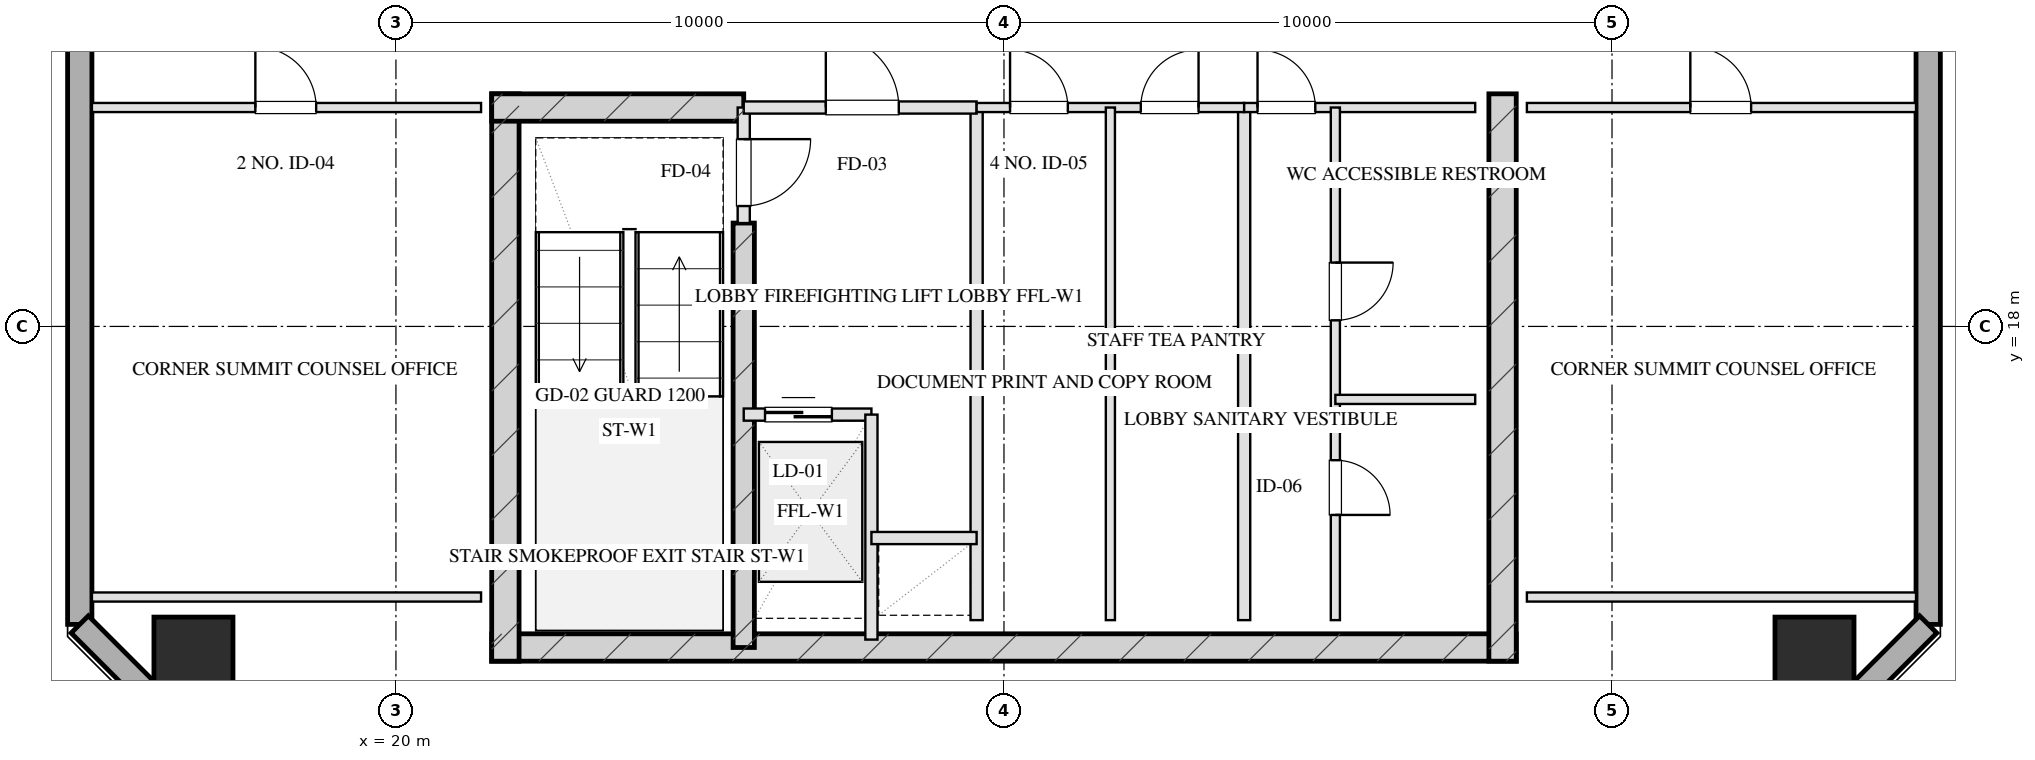
"""IFC4 building model, lengths in metres.
Left out: names, types, materials, properties, quantities, classifications, styles, units other than length and angle.
Written with IfcOpenShell. Run it as: python <this file> out.ifc"""

import sys

from ifc_helpers import new_model, si_unit, direction, frame, frame_2d, origin, origin_2d, place, context, subcontext, project, spatial, rectangle, hollow_rectangle, extrude, element, fill, save


model = new_model("IFC4")
c1 = context("Model", 3, precision=1e-05, world=origin(), true_north=direction((0.0, 1.0)))
c2 = subcontext(c1, "Body", "Model", "MODEL_VIEW")
j1 = project(units=[si_unit("LENGTHUNIT", "METRE"), si_unit("PLANEANGLEUNIT", "RADIAN")], contexts=[c1])
p1 = place(None, origin())
s1 = spatial("IfcSite", under=j1, at=p1, CompositionType="ELEMENT")
p2 = place(p1, origin())
s2 = spatial("IfcBuilding", under=s1, at=p2, CompositionType="ELEMENT")
p3 = place(p2, frame((0.0, 0.0, 256.8)))
s3 = spatial("IfcBuildingStorey", under=s2, at=p3, CompositionType="ELEMENT", Elevation=256.8)
p4 = place(p3, frame((21.575, 12.72, 0.0), z_axis=(0.0, 0.0, 1.0), x_axis=(1.0, 0.0, 0.0)))
e1 = element("IfcWall", 1, at=p4, inside=s3, PredefinedType="SHEAR", context=c2, shape_type="SweptSolid", body=[
    extrude(rectangle(XDim=16.85, YDim=0.45, at=frame_2d((8.425, 0.0))), origin(), (0.0, 0.0, 1.0), 3.2),
])
for number, where, z_axis, x_axis in (
    (2, (21.8, 21.825, 0.0), (0.0, 0.0, 1.0), (0.0, -1.0, 0.0)),
    (3, (38.2, 21.825, 0.0), (0.0, 0.0, 1.0), (0.0, -1.0, 0.0)),
):
    element("IfcWall", number, at=place(p3, frame(where, z_axis=z_axis, x_axis=x_axis)), inside=s3, PredefinedType="SHEAR", context=c2, shape_type="SweptSolid", body=[
        extrude(rectangle(XDim=9.33, YDim=0.45, at=frame_2d((4.665, 0.0))), origin(), (0.0, 0.0, 1.0), 3.2),
    ])
p5 = place(p3, frame((25.72, 19.7, 0.0), z_axis=(0.0, 0.0, 1.0), x_axis=(0.0, -1.0, 0.0)))
e4 = element("IfcWall", 4, at=p5, inside=s3, PredefinedType="SHEAR", context=c2, shape_type="SweptSolid", body=[
    extrude(rectangle(XDim=6.98, YDim=0.35, at=frame_2d((3.49, 0.0))), origin(), (0.0, 0.0, 1.0), 3.2),
])
p6 = place(p3, frame((21.575, 21.6, 0.0), z_axis=(0.0, 0.0, 1.0), x_axis=(1.0, 0.0, 0.0)))
e5 = element("IfcWall", 5, at=p6, inside=s3, PredefinedType="SHEAR", context=c2, shape_type="SweptSolid", body=[
    extrude(rectangle(XDim=4.145, YDim=0.45, at=frame_2d((2.073, 0.0))), origin(), (0.0, 0.0, 1.0), 3.2),
])
for number, where, z_axis, x_axis in (
    (6, (16.67, 12.57, 0.0), (0.0, 0.0, 1.0), (1.0, 0.0, 0.0)),
    (7, (43.33, 12.57, 0.0), (0.0, 0.0, 1.0), (1.0, 0.0, 0.0)),
):
    element("IfcColumn", number, at=place(p3, frame(where, z_axis=z_axis, x_axis=x_axis)), inside=s3, PredefinedType="COLUMN", context=c2, shape_type="SweptSolid", body=[
        extrude(hollow_rectangle(XDim=1.3, YDim=1.3, WallThickness=0.045, at=origin_2d()), origin(), (0.0, 0.0, 1.0), 3.201),
    ])
p7 = place(p3, frame((14.8, 13.1, 0.0), z_axis=(0.0, 0.0, 1.0), x_axis=(0.0, 1.0, 0.0)))
e8 = element("IfcWall", 8, at=p7, inside=s3, PredefinedType="SOLIDWALL", context=c2, shape_type="SweptSolid", body=[
    extrude(rectangle(XDim=41.8, YDim=0.4, at=frame_2d((20.9, 0.0))), origin(), (0.0, 0.0, 1.0), 2.36),
])
p8 = place(p7, frame((22.525, 0.0, 0.75)))
e9 = element("IfcOpeningElement", 9, at=p8, cuts=e8, PredefinedType="OPENING", context=c2, shape_type="SweptSolid", body=[
    extrude(rectangle(XDim=1.95, YDim=1.21, at=frame_2d((0.975, 0.605))), frame((0.0, 0.21, 0.0), z_axis=(0.0, -1.0, 0.0), x_axis=(1.0, 0.0, 0.0)), (0.0, 0.0, 1.0), 0.42),
])
p9 = place(p7, frame((26.325, 0.0, 0.75)))
e10 = element("IfcOpeningElement", 10, at=p9, cuts=e8, PredefinedType="OPENING", context=c2, shape_type="SweptSolid", body=[
    extrude(rectangle(XDim=1.95, YDim=1.21, at=frame_2d((0.975, 0.605))), frame((0.0, 0.21, 0.0), z_axis=(0.0, -1.0, 0.0), x_axis=(1.0, 0.0, 0.0)), (0.0, 0.0, 1.0), 0.42),
])
p10 = place(p7, frame((14.55, 0.0, 0.0)))
e11 = element("IfcOpeningElement", 11, at=p10, cuts=e8, PredefinedType="OPENING", context=c2, shape_type="SweptSolid", body=[
    extrude(rectangle(XDim=1.1, YDim=2.15, at=frame_2d((0.55, 1.075))), frame((0.0, 0.21, 0.0), z_axis=(0.0, -1.0, 0.0), x_axis=(1.0, 0.0, 0.0)), (0.0, 0.0, 1.0), 0.42),
])
p11 = place(p3, frame((45.2, 54.9, 0.0), z_axis=(0.0, 0.0, 1.0), x_axis=(0.0, -1.0, 0.0)))
e12 = element("IfcWall", 12, at=p11, inside=s3, PredefinedType="SOLIDWALL", context=c2, shape_type="SweptSolid", body=[
    extrude(rectangle(XDim=41.8, YDim=0.4, at=frame_2d((20.9, 0.0))), origin(), (0.0, 0.0, 1.0), 2.36),
])
p12 = place(p11, frame((17.325, 0.0, 0.75)))
e13 = element("IfcOpeningElement", 13, at=p12, cuts=e12, PredefinedType="OPENING", context=c2, shape_type="SweptSolid", body=[
    extrude(rectangle(XDim=1.95, YDim=1.21, at=frame_2d((0.975, 0.605))), frame((0.0, 0.21, 0.0), z_axis=(0.0, -1.0, 0.0), x_axis=(1.0, 0.0, 0.0)), (0.0, 0.0, 1.0), 0.42),
])
p13 = place(p11, frame((13.525, 0.0, 0.75)))
e14 = element("IfcOpeningElement", 14, at=p13, cuts=e12, PredefinedType="OPENING", context=c2, shape_type="SweptSolid", body=[
    extrude(rectangle(XDim=1.95, YDim=1.21, at=frame_2d((0.975, 0.605))), frame((0.0, 0.21, 0.0), z_axis=(0.0, -1.0, 0.0), x_axis=(1.0, 0.0, 0.0)), (0.0, 0.0, 1.0), 0.42),
])
p14 = place(p11, frame((23.45, 0.0, 0.0)))
e15 = element("IfcOpeningElement", 15, at=p14, cuts=e12, PredefinedType="OPENING", context=c2, shape_type="SweptSolid", body=[
    extrude(rectangle(XDim=1.1, YDim=2.15, at=frame_2d((0.55, 1.075))), frame((0.0, 0.21, 0.0), z_axis=(0.0, -1.0, 0.0), x_axis=(1.0, 0.0, 0.0)), (0.0, 0.0, 1.0), 0.42),
])
for number, where, z_axis, x_axis in (
    (16, (45.2, 13.1, 0.0), (0.0, 0.0, 1.0), (-0.707, -0.707, 0.0)),
    (17, (17.2, 10.7, 0.0), (0.0, 0.0, 1.0), (-0.707, 0.707, 0.0)),
):
    element("IfcWall", number, at=place(p3, frame(where, z_axis=z_axis, x_axis=x_axis)), inside=s3, PredefinedType="SOLIDWALL", context=c2, shape_type="SweptSolid", body=[
        extrude(rectangle(XDim=3.394, YDim=0.4, at=frame_2d((1.697, 0.0))), origin(), (0.0, 0.0, 1.0), 2.36),
    ])
p15 = place(p3, frame((25.72, 21.6, 0.0), z_axis=(0.0, 0.0, 1.0), x_axis=(0.0, -1.0, 0.0)))
e18 = element("IfcWall", 18, at=p15, inside=s3, PredefinedType="PARTITIONING", context=c2, shape_type="SweptSolid", body=[
    extrude(rectangle(XDim=1.9, YDim=0.2, at=frame_2d((0.95, 0.0))), origin(), (0.0, 0.0, 1.0), 2.925),
])
p16 = place(p15, frame((0.52, 0.0, 0.0)))
e19 = element("IfcOpeningElement", 19, at=p16, cuts=e18, PredefinedType="OPENING", context=c2, shape_type="SweptSolid", body=[
    extrude(rectangle(XDim=1.1, YDim=2.05, at=frame_2d((0.55, 1.025))), frame((0.0, 0.11, 0.0), z_axis=(0.0, -1.0, 0.0), x_axis=(1.0, 0.0, 0.0)), (0.0, 0.0, 1.0), 0.22),
])
p17 = place(p3, frame((29.55, 21.6, 0.0), z_axis=(0.0, 0.0, 1.0), x_axis=(0.0, -1.0, 0.0)))
e20 = element("IfcWall", 20, at=p17, inside=s3, PredefinedType="PARTITIONING", context=c2, shape_type="SweptSolid", body=[
    extrude(rectangle(XDim=8.43, YDim=0.2, at=frame_2d((4.215, 0.0))), origin(), (0.0, 0.0, 1.0), 2.925),
])
p18 = place(p3, frame((25.72, 21.6, 0.0), z_axis=(0.0, 0.0, 1.0), x_axis=(1.0, 0.0, 0.0)))
e21 = element("IfcWall", 21, at=p18, inside=s3, PredefinedType="PARTITIONING", context=c2, shape_type="SweptSolid", body=[
    extrude(rectangle(XDim=3.83, YDim=0.2, at=frame_2d((1.915, 0.0))), origin(), (0.0, 0.0, 1.0), 2.925),
])
p19 = place(p18, frame((1.35, 0.0, 0.0)))
e22 = element("IfcOpeningElement", 22, at=p19, cuts=e21, PredefinedType="OPENING", context=c2, shape_type="SweptSolid", body=[
    extrude(rectangle(XDim=1.2, YDim=2.05, at=frame_2d((0.6, 1.025))), frame((0.0, 0.11, 0.0), z_axis=(0.0, -1.0, 0.0), x_axis=(1.0, 0.0, 0.0)), (0.0, 0.0, 1.0), 0.22),
])
p20 = place(p3, frame((25.72, 16.55, 0.0), z_axis=(0.0, 0.0, 1.0), x_axis=(1.0, 0.0, 0.0)))
e23 = element("IfcWall", 23, at=p20, inside=s3, PredefinedType="PARTITIONING", context=c2, shape_type="SweptSolid", body=[
    extrude(rectangle(XDim=2.1, YDim=0.2, at=frame_2d((1.05, 0.0))), origin(), (0.0, 0.0, 1.0), 2.925),
])
p21 = place(p20, frame((0.35, 0.0, 0.0)))
e24 = element("IfcOpeningElement", 24, at=p21, cuts=e23, PredefinedType="OPENING", context=c2, shape_type="SweptSolid", body=[
    extrude(rectangle(XDim=1.1, YDim=2.05, at=frame_2d((0.55, 1.025))), frame((0.0, 0.11, 0.0), z_axis=(0.0, -1.0, 0.0), x_axis=(1.0, 0.0, 0.0)), (0.0, 0.0, 1.0), 0.22),
])
p22 = place(p3, frame((27.82, 16.55, 0.0), z_axis=(0.0, 0.0, 1.0), x_axis=(0.0, -1.0, 0.0)))
e25 = element("IfcWall", 25, at=p22, inside=s3, PredefinedType="PARTITIONING", context=c2, shape_type="SweptSolid", body=[
    extrude(rectangle(XDim=3.7, YDim=0.2, at=frame_2d((1.85, 0.0))), origin(), (0.0, 0.0, 1.0), 2.925),
])
p23 = place(p3, frame((27.82, 14.52, 0.0), z_axis=(0.0, 0.0, 1.0), x_axis=(1.0, 0.0, 0.0)))
e26 = element("IfcWall", 26, at=p23, inside=s3, PredefinedType="PARTITIONING", context=c2, shape_type="SweptSolid", body=[
    extrude(rectangle(XDim=1.73, YDim=0.2, at=frame_2d((0.865, 0.0))), origin(), (0.0, 0.0, 1.0), 2.925),
])
p24 = place(p3, frame((33.95, 21.6, 0.0), z_axis=(0.0, 0.0, 1.0), x_axis=(0.0, -1.0, 0.0)))
e27 = element("IfcWall", 27, at=p24, inside=s3, PredefinedType="PARTITIONING", context=c2, shape_type="SweptSolid", body=[
    extrude(rectangle(XDim=8.43, YDim=0.2, at=frame_2d((4.215, 0.0))), origin(), (0.0, 0.0, 1.0), 2.925),
])
p25 = place(p3, frame((29.55, 21.6, 0.0), z_axis=(0.0, 0.0, 1.0), x_axis=(1.0, 0.0, 0.0)))
e28 = element("IfcWall", 28, at=p25, inside=s3, PredefinedType="PARTITIONING", context=c2, shape_type="SweptSolid", body=[
    extrude(rectangle(XDim=4.4, YDim=0.15, at=frame_2d((2.2, 0.0))), origin(), (0.0, 0.0, 1.0), 2.925),
])
p26 = place(p25, frame((0.55, 0.0, 0.0)))
e29 = element("IfcOpeningElement", 29, at=p26, cuts=e28, PredefinedType="OPENING", context=c2, shape_type="SweptSolid", body=[
    extrude(rectangle(XDim=0.95, YDim=2.05, at=frame_2d((0.475, 1.025))), frame((0.0, 0.085, 0.0), z_axis=(0.0, -1.0, 0.0), x_axis=(1.0, 0.0, 0.0)), (0.0, 0.0, 1.0), 0.17),
])
p27 = place(p25, frame((2.7, 0.0, 0.0)))
e30 = element("IfcOpeningElement", 30, at=p27, cuts=e28, PredefinedType="OPENING", context=c2, shape_type="SweptSolid", body=[
    extrude(rectangle(XDim=0.95, YDim=2.05, at=frame_2d((0.475, 1.025))), frame((0.0, 0.085, 0.0), z_axis=(0.0, -1.0, 0.0), x_axis=(1.0, 0.0, 0.0)), (0.0, 0.0, 1.0), 0.17),
])
p28 = place(p3, frame((31.75, 21.6, 0.0), z_axis=(0.0, 0.0, 1.0), x_axis=(0.0, -1.0, 0.0)))
e31 = element("IfcWall", 31, at=p28, inside=s3, PredefinedType="PARTITIONING", context=c2, shape_type="SweptSolid", body=[
    extrude(rectangle(XDim=8.43, YDim=0.15, at=frame_2d((4.215, 0.0))), origin(), (0.0, 0.0, 1.0), 2.925),
])
p29 = place(p3, frame((33.95, 21.6, 0.0), z_axis=(0.0, 0.0, 1.0), x_axis=(1.0, 0.0, 0.0)))
e32 = element("IfcWall", 32, at=p29, inside=s3, PredefinedType="PARTITIONING", context=c2, shape_type="SweptSolid", body=[
    extrude(rectangle(XDim=3.8, YDim=0.15, at=frame_2d((1.9, 0.0))), origin(), (0.0, 0.0, 1.0), 2.925),
])
p30 = place(p29, frame((0.22, 0.0, 0.0)))
e33 = element("IfcOpeningElement", 33, at=p30, cuts=e32, PredefinedType="OPENING", context=c2, shape_type="SweptSolid", body=[
    extrude(rectangle(XDim=0.95, YDim=2.05, at=frame_2d((0.475, 1.025))), frame((0.0, 0.085, 0.0), z_axis=(0.0, -1.0, 0.0), x_axis=(1.0, 0.0, 0.0)), (0.0, 0.0, 1.0), 0.17),
])
p31 = place(p3, frame((35.45, 21.6, 0.0), z_axis=(0.0, 0.0, 1.0), x_axis=(0.0, -1.0, 0.0)))
e34 = element("IfcWall", 34, at=p31, inside=s3, PredefinedType="PARTITIONING", context=c2, shape_type="SweptSolid", body=[
    extrude(rectangle(XDim=8.43, YDim=0.15, at=frame_2d((4.215, 0.0))), origin(), (0.0, 0.0, 1.0), 2.515),
])
p32 = place(p31, frame((2.55, 0.0, 0.0)))
e35 = element("IfcOpeningElement", 35, at=p32, cuts=e34, PredefinedType="OPENING", context=c2, shape_type="SweptSolid", body=[
    extrude(rectangle(XDim=0.95, YDim=2.05, at=frame_2d((0.475, 1.025))), frame((0.0, 0.085, 0.0), z_axis=(0.0, -1.0, 0.0), x_axis=(1.0, 0.0, 0.0)), (0.0, 0.0, 1.0), 0.17),
])
p33 = place(p31, frame((5.8, 0.0, 0.0)))
e36 = element("IfcOpeningElement", 36, at=p33, cuts=e34, PredefinedType="OPENING", context=c2, shape_type="SweptSolid", body=[
    extrude(rectangle(XDim=0.9, YDim=2.05, at=frame_2d((0.45, 1.025))), frame((0.0, 0.085, 0.0), z_axis=(0.0, -1.0, 0.0), x_axis=(1.0, 0.0, 0.0)), (0.0, 0.0, 1.0), 0.17),
])
p34 = place(p3, frame((35.45, 16.8, 0.0), z_axis=(0.0, 0.0, 1.0), x_axis=(1.0, 0.0, 0.0)))
e37 = element("IfcWall", 37, at=p34, inside=s3, PredefinedType="PARTITIONING", context=c2, shape_type="SweptSolid", body=[
    extrude(rectangle(XDim=2.3, YDim=0.15, at=frame_2d((1.15, 0.0))), origin(), (0.0, 0.0, 1.0), 2.925),
])
p35 = place(p3, frame((15.0, 13.55, 0.0), z_axis=(0.0, 0.0, 1.0), x_axis=(1.0, 0.0, 0.0)))
e38 = element("IfcWall", 38, at=p35, inside=s3, PredefinedType="PARTITIONING", context=c2, shape_type="SweptSolid", body=[
    extrude(rectangle(XDim=6.4, YDim=0.15, at=frame_2d((3.2, 0.0))), origin(), (0.0, 0.0, 1.0), 2.925),
])
p36 = place(p3, frame((15.0, 21.6, 0.0), z_axis=(0.0, 0.0, 1.0), x_axis=(1.0, 0.0, 0.0)))
e39 = element("IfcWall", 39, at=p36, inside=s3, PredefinedType="PARTITIONING", context=c2, shape_type="SweptSolid", body=[
    extrude(rectangle(XDim=6.4, YDim=0.15, at=frame_2d((3.2, 0.0))), origin(), (0.0, 0.0, 1.0), 2.925),
])
p37 = place(p36, frame((2.688, 0.0, 0.0)))
e40 = element("IfcOpeningElement", 40, at=p37, cuts=e39, PredefinedType="OPENING", context=c2, shape_type="SweptSolid", body=[
    extrude(rectangle(XDim=1.0, YDim=2.05, at=frame_2d((0.5, 1.025))), frame((0.0, 0.085, 0.0), z_axis=(0.0, -1.0, 0.0), x_axis=(1.0, 0.0, 0.0)), (0.0, 0.0, 1.0), 0.17),
])
p38 = place(p3, frame((38.6, 13.55, 0.0), z_axis=(0.0, 0.0, 1.0), x_axis=(1.0, 0.0, 0.0)))
e41 = element("IfcWall", 41, at=p38, inside=s3, PredefinedType="PARTITIONING", context=c2, shape_type="SweptSolid", body=[
    extrude(rectangle(XDim=6.4, YDim=0.15, at=frame_2d((3.2, 0.0))), origin(), (0.0, 0.0, 1.0), 2.925),
])
p39 = place(p3, frame((38.6, 21.6, 0.0), z_axis=(0.0, 0.0, 1.0), x_axis=(1.0, 0.0, 0.0)))
e42 = element("IfcWall", 42, at=p39, inside=s3, PredefinedType="PARTITIONING", context=c2, shape_type="SweptSolid", body=[
    extrude(rectangle(XDim=6.4, YDim=0.15, at=frame_2d((3.2, 0.0))), origin(), (0.0, 0.0, 1.0), 2.925),
])
p40 = place(p39, frame((2.688, 0.0, 0.0)))
e43 = element("IfcOpeningElement", 43, at=p40, cuts=e42, PredefinedType="OPENING", context=c2, shape_type="SweptSolid", body=[
    extrude(rectangle(XDim=1.0, YDim=2.05, at=frame_2d((0.5, 1.025))), frame((0.0, 0.085, 0.0), z_axis=(0.0, -1.0, 0.0), x_axis=(1.0, 0.0, 0.0)), (0.0, 0.0, 1.0), 0.17),
])
p41 = place(p16, origin())
e44 = element("IfcDoor", 44, at=p41, inside=s3, OperationType="SINGLE_SWING_LEFT", PredefinedType="DOOR", context=c2, shape_type="SweptSolid", body=[
    extrude(rectangle(XDim=1.1, YDim=2.05, at=frame_2d((0.55, 1.025))), frame((0.0, 0.025, 0.0), z_axis=(0.0, -1.0, 0.0), x_axis=(1.0, 0.0, 0.0)), (0.0, 0.0, 1.0), 0.05),
])
fill(e19, e44)
p42 = place(p19, origin())
e45 = element("IfcDoor", 45, at=p42, inside=s3, OperationType="SINGLE_SWING_LEFT", PredefinedType="DOOR", context=c2, shape_type="SweptSolid", body=[
    extrude(rectangle(XDim=1.2, YDim=2.05, at=frame_2d((0.6, 1.025))), frame((0.0, 0.025, 0.0), z_axis=(0.0, -1.0, 0.0), x_axis=(1.0, 0.0, 0.0)), (0.0, 0.0, 1.0), 0.05),
])
fill(e22, e45)
p43 = place(p21, origin())
e46 = element("IfcDoor", 46, at=p43, inside=s3, OperationType="DOUBLE_DOOR_SLIDING", PredefinedType="DOOR", context=c2, shape_type="SweptSolid", body=[
    extrude(rectangle(XDim=1.1, YDim=2.05, at=frame_2d((0.55, 1.025))), frame((0.0, 0.025, 0.0), z_axis=(0.0, -1.0, 0.0), x_axis=(1.0, 0.0, 0.0)), (0.0, 0.0, 1.0), 0.05),
])
fill(e24, e46)
p44 = place(p26, origin())
e47 = element("IfcDoor", 47, at=p44, inside=s3, OperationType="SINGLE_SWING_LEFT", PredefinedType="DOOR", context=c2, shape_type="SweptSolid", body=[
    extrude(rectangle(XDim=0.95, YDim=2.05, at=frame_2d((0.475, 1.025))), frame((0.0, 0.025, 0.0), z_axis=(0.0, -1.0, 0.0), x_axis=(1.0, 0.0, 0.0)), (0.0, 0.0, 1.0), 0.05),
])
fill(e29, e47)
p45 = place(p27, origin())
e48 = element("IfcDoor", 48, at=p45, inside=s3, OperationType="SINGLE_SWING_RIGHT", PredefinedType="DOOR", context=c2, shape_type="SweptSolid", body=[
    extrude(rectangle(XDim=0.95, YDim=2.05, at=frame_2d((0.475, 1.025))), frame((0.0, 0.025, 0.0), z_axis=(0.0, -1.0, 0.0), x_axis=(1.0, 0.0, 0.0)), (0.0, 0.0, 1.0), 0.05),
])
fill(e30, e48)
p46 = place(p30, origin())
e49 = element("IfcDoor", 49, at=p46, inside=s3, OperationType="SINGLE_SWING_LEFT", PredefinedType="DOOR", context=c2, shape_type="SweptSolid", body=[
    extrude(rectangle(XDim=0.95, YDim=2.05, at=frame_2d((0.475, 1.025))), frame((0.0, 0.025, 0.0), z_axis=(0.0, -1.0, 0.0), x_axis=(1.0, 0.0, 0.0)), (0.0, 0.0, 1.0), 0.05),
])
fill(e33, e49)
p47 = place(p32, origin())
e50 = element("IfcDoor", 50, at=p47, inside=s3, OperationType="SINGLE_SWING_LEFT", PredefinedType="DOOR", context=c2, shape_type="SweptSolid", body=[
    extrude(rectangle(XDim=0.95, YDim=2.05, at=frame_2d((0.475, 1.025))), frame((0.0, 0.025, 0.0), z_axis=(0.0, -1.0, 0.0), x_axis=(1.0, 0.0, 0.0)), (0.0, 0.0, 1.0), 0.05),
])
fill(e35, e50)
p48 = place(p33, origin())
e51 = element("IfcDoor", 51, at=p48, inside=s3, OperationType="SINGLE_SWING_RIGHT", PredefinedType="DOOR", context=c2, shape_type="SweptSolid", body=[
    extrude(rectangle(XDim=0.9, YDim=2.05, at=frame_2d((0.45, 1.025))), frame((0.0, 0.025, 0.0), z_axis=(0.0, -1.0, 0.0), x_axis=(1.0, 0.0, 0.0)), (0.0, 0.0, 1.0), 0.05),
])
fill(e36, e51)
p49 = place(p37, origin())
e52 = element("IfcDoor", 52, at=p49, inside=s3, OperationType="SINGLE_SWING_LEFT", PredefinedType="DOOR", context=c2, shape_type="SweptSolid", body=[
    extrude(rectangle(XDim=1.0, YDim=2.05, at=frame_2d((0.5, 1.025))), frame((0.0, 0.025, 0.0), z_axis=(0.0, -1.0, 0.0), x_axis=(1.0, 0.0, 0.0)), (0.0, 0.0, 1.0), 0.05),
])
fill(e40, e52)
p50 = place(p40, origin())
e53 = element("IfcDoor", 53, at=p50, inside=s3, OperationType="SINGLE_SWING_LEFT", PredefinedType="DOOR", context=c2, shape_type="SweptSolid", body=[
    extrude(rectangle(XDim=1.0, YDim=2.05, at=frame_2d((0.5, 1.025))), frame((0.0, 0.025, 0.0), z_axis=(0.0, -1.0, 0.0), x_axis=(1.0, 0.0, 0.0)), (0.0, 0.0, 1.0), 0.05),
])
fill(e43, e53)
save(model, sys.argv[1])
